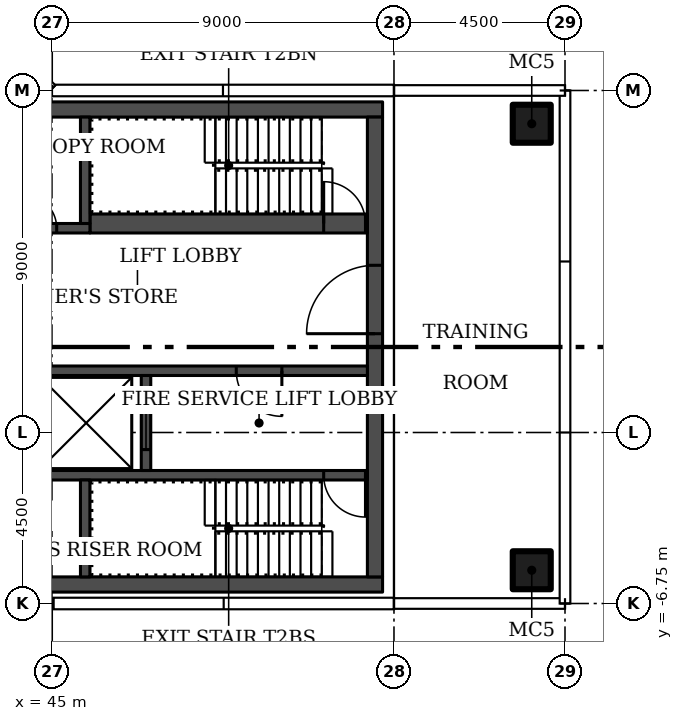
"""IFC4 building model, lengths in metres.
Left out: names, types, materials, properties, quantities, classifications, styles, units other than length and angle.
Written with IfcOpenShell. Run it as: python <this file> out.ifc"""

import sys

from ifc_helpers import new_model, si_unit, direction, frame, frame_2d, origin, origin_2d, place, context, subcontext, project, spatial, rectangle, hollow_rectangle, extrude, element, fill, save


model = new_model("IFC4")
c1 = context("Model", 3, precision=1e-05, world=origin(), true_north=direction((0.0, 1.0)))
c2 = subcontext(c1, "Body", "Model", "MODEL_VIEW")
j1 = project(units=[si_unit("LENGTHUNIT", "METRE"), si_unit("PLANEANGLEUNIT", "RADIAN")], contexts=[c1])
p1 = place(None, origin())
s1 = spatial("IfcSite", under=j1, at=p1, CompositionType="ELEMENT")
p2 = place(p1, origin())
s2 = spatial("IfcBuilding", under=s1, at=p2, CompositionType="ELEMENT")
p3 = place(p2, frame((0.0, 0.0, 217.8)))
s3 = spatial("IfcBuildingStorey", under=s2, at=p3, CompositionType="ELEMENT", Elevation=217.8)
for number, where in (
    (1, (57.625, -5.875, 0.0)),
    (2, (57.625, 5.875, 0.0)),
):
    element("IfcColumn", number, at=place(p3, frame(where)), inside=s3, PredefinedType="COLUMN", context=c2, shape_type="SweptSolid", body=[
        extrude(hollow_rectangle(XDim=1.0, YDim=1.0, WallThickness=0.04, at=origin_2d()), origin(), (0.0, 0.0, 1.0), 3.55),
    ])
for number, where, z_axis, x_axis in (
    (3, (53.7, -6.25, 0.0), (0.0, 0.0, 1.0), (-1.0, 0.0, 0.0)),
    (4, (53.7, 6.25, 0.0), (0.0, 0.0, 1.0), (-1.0, 0.0, 0.0)),
):
    element("IfcWall", number, at=place(p3, frame(where, z_axis=z_axis, x_axis=x_axis)), inside=s3, PredefinedType="SHEAR", context=c2, shape_type="SweptSolid", body=[
        extrude(rectangle(XDim=12.9, YDim=0.4, at=frame_2d((6.45, 0.0))), origin(), (0.0, 0.0, 1.0), 3.55),
    ])
p4 = place(p3, frame((53.5, -6.05, 0.0), z_axis=(0.0, 0.0, 1.0), x_axis=(0.0, 1.0, 0.0)))
e5 = element("IfcWall", 5, at=p4, inside=s3, PredefinedType="SHEAR", context=c2, shape_type="SweptSolid", body=[
    extrude(rectangle(XDim=12.1, YDim=0.4, at=frame_2d((6.05, 0.0))), origin(), (0.0, 0.0, 1.0), 3.55),
])
p5 = place(p4, frame((6.4, 0.0, 0.0)))
e6 = element("IfcOpeningElement", 6, at=p5, cuts=e5, PredefinedType="OPENING", context=c2, shape_type="SweptSolid", body=[
    extrude(rectangle(XDim=1.8, YDim=2.4, at=frame_2d((0.9, 1.2))), frame((0.0, 0.21, 0.0), z_axis=(0.0, -1.0, 0.0), x_axis=(1.0, 0.0, 0.0)), (0.0, 0.0, 1.0), 0.42),
])
p6 = place(p3, frame((53.3, -3.375, 0.0), z_axis=(0.0, 0.0, 1.0), x_axis=(-1.0, 0.0, 0.0)))
e7 = element("IfcWall", 7, at=p6, inside=s3, PredefinedType="SHEAR", context=c2, shape_type="SweptSolid", body=[
    extrude(rectangle(XDim=12.1, YDim=0.25, at=frame_2d((6.05, 0.0))), origin(), (0.0, 0.0, 1.0), 3.55),
])
p7 = place(p6, frame((0.05, 0.0, 0.0)))
e8 = element("IfcOpeningElement", 8, at=p7, cuts=e7, PredefinedType="OPENING", context=c2, shape_type="SweptSolid", body=[
    extrude(rectangle(XDim=1.1, YDim=2.1, at=frame_2d((0.55, 1.05))), frame((0.0, 0.135, 0.0), z_axis=(0.0, -1.0, 0.0), x_axis=(1.0, 0.0, 0.0)), (0.0, 0.0, 1.0), 0.27),
])
p8 = place(p3, frame((45.875, -6.05, 0.0), z_axis=(0.0, 0.0, 1.0), x_axis=(0.0, 1.0, 0.0)))
e9 = element("IfcWall", 9, at=p8, inside=s3, PredefinedType="SHEAR", context=c2, shape_type="SweptSolid", body=[
    extrude(rectangle(XDim=2.55, YDim=0.25, at=frame_2d((1.275, 0.0))), origin(), (0.0, 0.0, 1.0), 3.55),
])
p9 = place(p3, frame((53.3, -0.625, 0.0), z_axis=(0.0, 0.0, 1.0), x_axis=(-1.0, 0.0, 0.0)))
e10 = element("IfcWall", 10, at=p9, inside=s3, PredefinedType="SHEAR", context=c2, shape_type="SweptSolid", body=[
    extrude(rectangle(XDim=12.1, YDim=0.25, at=frame_2d((6.05, 0.0))), origin(), (0.0, 0.0, 1.0), 3.55),
])
p10 = place(p9, frame((2.25, 0.0, 0.0)))
e11 = element("IfcOpeningElement", 11, at=p10, cuts=e10, PredefinedType="OPENING", context=c2, shape_type="SweptSolid", body=[
    extrude(rectangle(XDim=1.2, YDim=2.1, at=frame_2d((0.6, 1.05))), frame((0.0, 0.135, 0.0), z_axis=(0.0, -1.0, 0.0), x_axis=(1.0, 0.0, 0.0)), (0.0, 0.0, 1.0), 0.27),
])
p11 = place(p9, frame((9.05, 0.0, 0.0)))
e12 = element("IfcOpeningElement", 12, at=p11, cuts=e10, PredefinedType="OPENING", context=c2, shape_type="SweptSolid", body=[
    extrude(rectangle(XDim=0.9, YDim=2.1, at=frame_2d((0.45, 1.05))), frame((0.0, 0.135, 0.0), z_axis=(0.0, -1.0, 0.0), x_axis=(1.0, 0.0, 0.0)), (0.0, 0.0, 1.0), 0.27),
])
p12 = place(p9, frame((10.675, 0.0, 0.0)))
e13 = element("IfcOpeningElement", 13, at=p12, cuts=e10, PredefinedType="OPENING", context=c2, shape_type="SweptSolid", body=[
    extrude(rectangle(XDim=0.9, YDim=2.1, at=frame_2d((0.45, 1.05))), frame((0.0, 0.135, 0.0), z_axis=(0.0, -1.0, 0.0), x_axis=(1.0, 0.0, 0.0)), (0.0, 0.0, 1.0), 0.27),
])
p13 = place(p3, frame((47.475, -3.25, 0.0), z_axis=(0.0, 0.0, 1.0), x_axis=(0.0, 1.0, 0.0)))
e14 = element("IfcWall", 14, at=p13, inside=s3, PredefinedType="SHEAR", context=c2, shape_type="SweptSolid", body=[
    extrude(rectangle(XDim=2.5, YDim=0.25, at=frame_2d((1.25, 0.0))), origin(), (0.0, 0.0, 1.0), 3.55),
])
p14 = place(p13, frame((0.55, 0.0, 0.0)))
e15 = element("IfcOpeningElement", 15, at=p14, cuts=e14, PredefinedType="OPENING", context=c2, shape_type="SweptSolid", body=[
    extrude(rectangle(XDim=1.4, YDim=2.4, at=frame_2d((0.7, 1.2))), frame((0.0, 0.135, 0.0), z_axis=(0.0, -1.0, 0.0), x_axis=(1.0, 0.0, 0.0)), (0.0, 0.0, 1.0), 0.27),
])
p15 = place(p3, frame((46.0, 3.25, 0.0)))
e16 = element("IfcWall", 16, at=p15, inside=s3, PredefinedType="SHEAR", context=c2, shape_type="SweptSolid", body=[
    extrude(rectangle(XDim=7.3, YDim=0.5, at=frame_2d((3.65, 0.0))), origin(), (0.0, 0.0, 1.0), 3.55),
])
p16 = place(p15, frame((6.15, 0.0, 0.0)))
e17 = element("IfcOpeningElement", 17, at=p16, cuts=e16, PredefinedType="OPENING", context=c2, shape_type="SweptSolid", body=[
    extrude(rectangle(XDim=1.1, YDim=2.1, at=frame_2d((0.55, 1.05))), frame((0.0, 0.26, 0.0), z_axis=(0.0, -1.0, 0.0), x_axis=(1.0, 0.0, 0.0)), (0.0, 0.0, 1.0), 0.52),
])
p17 = place(p3, frame((41.2, 3.125, 0.0)))
e18 = element("IfcWall", 18, at=p17, inside=s3, PredefinedType="SHEAR", context=c2, shape_type="SweptSolid", body=[
    extrude(rectangle(XDim=4.8, YDim=0.25, at=frame_2d((2.4, 0.0))), origin(), (0.0, 0.0, 1.0), 3.55),
])
p18 = place(p17, frame((0.525, 0.0, 0.0)))
e19 = element("IfcOpeningElement", 19, at=p18, cuts=e18, PredefinedType="OPENING", context=c2, shape_type="SweptSolid", body=[
    extrude(rectangle(XDim=1.1, YDim=2.1, at=frame_2d((0.55, 1.05))), frame((0.0, 0.135, 0.0), z_axis=(0.0, -1.0, 0.0), x_axis=(1.0, 0.0, 0.0)), (0.0, 0.0, 1.0), 0.27),
])
p19 = place(p17, frame((3.025, 0.0, 0.0)))
e20 = element("IfcOpeningElement", 20, at=p19, cuts=e18, PredefinedType="OPENING", context=c2, shape_type="SweptSolid", body=[
    extrude(rectangle(XDim=0.9, YDim=2.1, at=frame_2d((0.45, 1.05))), frame((0.0, 0.135, 0.0), z_axis=(0.0, -1.0, 0.0), x_axis=(1.0, 0.0, 0.0)), (0.0, 0.0, 1.0), 0.27),
])
p20 = place(p3, frame((45.875, 3.25, 0.0), z_axis=(0.0, 0.0, 1.0), x_axis=(0.0, 1.0, 0.0)))
e21 = element("IfcWall", 21, at=p20, inside=s3, PredefinedType="SHEAR", context=c2, shape_type="SweptSolid", body=[
    extrude(rectangle(XDim=2.8, YDim=0.25, at=frame_2d((1.4, 0.0))), origin(), (0.0, 0.0, 1.0), 3.55),
])
p21 = place(p5, origin())
e22 = element("IfcDoor", 22, at=p21, inside=s3, OperationType="DOUBLE_DOOR_SINGLE_SWING", PredefinedType="DOOR", context=c2, shape_type="SweptSolid", body=[
    extrude(rectangle(XDim=1.8, YDim=2.4, at=frame_2d((0.9, 1.2))), frame((0.0, 0.025, 0.0), z_axis=(0.0, -1.0, 0.0), x_axis=(1.0, 0.0, 0.0)), (0.0, 0.0, 1.0), 0.05),
])
fill(e6, e22)
p22 = place(p7, origin())
e23 = element("IfcDoor", 23, at=p22, inside=s3, OperationType="SINGLE_SWING_LEFT", PredefinedType="DOOR", context=c2, shape_type="SweptSolid", body=[
    extrude(rectangle(XDim=1.1, YDim=2.1, at=frame_2d((0.55, 1.05))), frame((0.0, 0.025, 0.0), z_axis=(0.0, -1.0, 0.0), x_axis=(1.0, 0.0, 0.0)), (0.0, 0.0, 1.0), 0.05),
])
fill(e8, e23)
p23 = place(p10, origin())
e24 = element("IfcDoor", 24, at=p23, inside=s3, OperationType="SINGLE_SWING_LEFT", PredefinedType="DOOR", context=c2, shape_type="SweptSolid", body=[
    extrude(rectangle(XDim=1.2, YDim=2.1, at=frame_2d((0.6, 1.05))), frame((0.0, 0.025, 0.0), z_axis=(0.0, -1.0, 0.0), x_axis=(1.0, 0.0, 0.0)), (0.0, 0.0, 1.0), 0.05),
])
fill(e11, e24)
p24 = place(p14, origin())
e25 = element("IfcDoor", 25, at=p24, inside=s3, OperationType="SLIDING_TO_LEFT", PredefinedType="DOOR", context=c2, shape_type="SweptSolid", body=[
    extrude(rectangle(XDim=1.4, YDim=2.4, at=frame_2d((0.7, 1.2))), frame((0.0, 0.025, 0.0), z_axis=(0.0, -1.0, 0.0), x_axis=(1.0, 0.0, 0.0)), (0.0, 0.0, 1.0), 0.05),
])
fill(e15, e25)
p25 = place(p16, origin())
e26 = element("IfcDoor", 26, at=p25, inside=s3, OperationType="SINGLE_SWING_RIGHT", PredefinedType="DOOR", context=c2, shape_type="SweptSolid", body=[
    extrude(rectangle(XDim=1.1, YDim=2.1, at=frame_2d((0.55, 1.05))), frame((0.0, 0.025, 0.0), z_axis=(0.0, -1.0, 0.0), x_axis=(1.0, 0.0, 0.0)), (0.0, 0.0, 1.0), 0.05),
])
fill(e17, e26)
p26 = place(p19, origin())
e27 = element("IfcDoor", 27, at=p26, inside=s3, OperationType="SINGLE_SWING_RIGHT", PredefinedType="DOOR", context=c2, shape_type="SweptSolid", body=[
    extrude(rectangle(XDim=0.9, YDim=2.1, at=frame_2d((0.45, 1.05))), frame((0.0, 0.025, 0.0), z_axis=(0.0, -1.0, 0.0), x_axis=(1.0, 0.0, 0.0)), (0.0, 0.0, 1.0), 0.05),
])
fill(e20, e27)
save(model, sys.argv[1])
